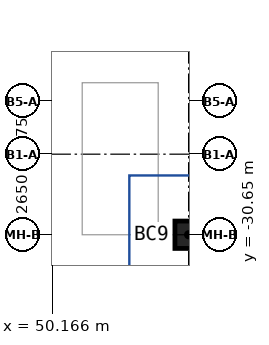
"""IFC4 building model, lengths in metres.
Left out: names, types, materials, properties, quantities, classifications, styles, units other than length and angle.
Written with IfcOpenShell. Run it as: python <this file> out.ifc"""

import sys

from ifc_helpers import new_model, si_unit, direction, frame, origin, origin_2d, place, context, subcontext, project, spatial, rectangle, extrude, source, transform, mapped, element, save


model = new_model("IFC4")
c1 = context("Model", 3, precision=1e-05, world=origin(), true_north=direction((0.0, 1.0)))
c2 = subcontext(c1, "Body", "Model", "MODEL_VIEW")
j1 = project(units=[si_unit("LENGTHUNIT", "METRE"), si_unit("PLANEANGLEUNIT", "RADIAN")], contexts=[c1])
p1 = place(None, origin())
s1 = spatial("IfcSite", under=j1, at=p1, CompositionType="ELEMENT")
p2 = place(p1, origin())
s2 = spatial("IfcBuilding", under=s1, at=p2, CompositionType="ELEMENT")
p3 = place(p2, frame((0.0, 0.0, -9.0)))
s3 = spatial("IfcBuildingStorey", under=s2, at=p3, CompositionType="ELEMENT", Elevation=-9.0)
m1 = source(origin(), c2, "Body", "SweptSolid", [
    extrude(rectangle(XDim=0.9, YDim=0.9, at=origin_2d()), origin(), (0.0, 0.0, 1.0), 4.5),
])
p4 = place(p3, frame((54.65, -30.65, 0.0), z_axis=(0.0, 0.0, 1.0), x_axis=(1.0, 0.0, 0.0)))
e1 = element("IfcColumn", 1, at=p4, inside=s3, PredefinedType="COLUMN", context=c2, shape_type="MappedRepresentation", body=[
    mapped(m1, transform((0.0, 0.0, 0.0))),
])
save(model, sys.argv[1])
